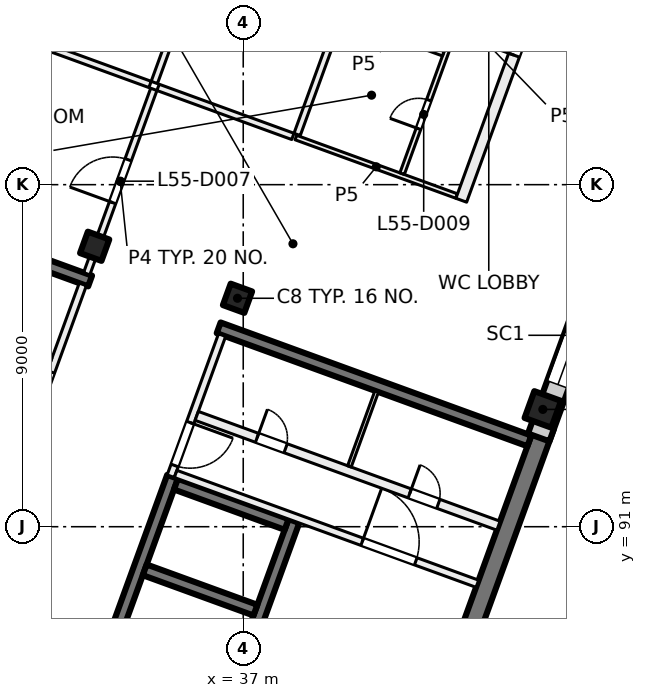
"""IFC4 building model, lengths in metres.
Left out: names, types, materials, properties, quantities, classifications, styles, units other than length and angle.
Written with IfcOpenShell. Run it as: python <this file> out.ifc"""

import sys

from ifc_helpers import new_model, si_unit, direction, frame, frame_2d, origin, origin_2d, place, context, subcontext, project, spatial, rectangle, extrude, element, fill, save


model = new_model("IFC4")
c1 = context("Model", 3, precision=1e-05, world=origin(), true_north=direction((0.0, 1.0)))
c2 = subcontext(c1, "Body", "Model", "MODEL_VIEW")
j1 = project(units=[si_unit("LENGTHUNIT", "METRE"), si_unit("PLANEANGLEUNIT", "RADIAN")], contexts=[c1])
p1 = place(None, origin())
s1 = spatial("IfcSite", under=j1, at=p1, CompositionType="ELEMENT")
p2 = place(p1, origin())
s2 = spatial("IfcBuilding", under=s1, at=p2, CompositionType="ELEMENT")
p3 = place(p2, frame((0.0, 0.0, 232.0)))
s3 = spatial("IfcBuildingStorey", under=s2, at=p3, CompositionType="ELEMENT", Elevation=232.0)
for number, where, z_axis, x_axis in (
    (1, (36.849, 97.011, 0.0), (0.0, 0.0, 1.0), (-0.342, -0.94, 0.0)),
    (2, (33.091, 98.379, 0.0), (0.0, 0.0, 1.0), (-0.342, -0.94, 0.0)),
):
    element("IfcColumn", number, at=place(p3, frame(where, z_axis=z_axis, x_axis=x_axis)), inside=s3, PredefinedType="COLUMN", context=c2, shape_type="SweptSolid", body=[
        extrude(rectangle(XDim=0.6, YDim=0.6, at=origin_2d()), origin(), (0.0, 0.0, 1.0), 4.0),
    ])
p4 = place(p3, frame((44.884, 94.087, 0.0), z_axis=(0.0, 0.0, 1.0), x_axis=(-0.342020143326, -0.939692620786, 0.0)))
e3 = element("IfcColumn", 3, at=p4, inside=s3, PredefinedType="COLUMN", context=c2, shape_type="SweptSolid", body=[
    extrude(rectangle(XDim=0.75, YDim=0.75, at=origin_2d()), origin(), (0.0, 0.0, 1.0), 4.0),
])
p5 = place(p3, frame((41.874, 85.232, 0.0), z_axis=(0.0, 0.0, 1.0), x_axis=(0.342020437038, 0.939692513883, 0.0)))
e4 = element("IfcWall", 4, at=p5, inside=s3, PredefinedType="SHEAR", context=c2, shape_type="SweptSolid", body=[
    extrude(rectangle(XDim=8.975, YDim=0.5, at=frame_2d((4.487, 0.0))), origin(), (0.0, 0.0, 1.0), 4.0),
])
p6 = place(p3, frame((30.949, 80.801, 0.0), z_axis=(0.0, 0.0, 1.0), x_axis=(0.342016684409, 0.939693879721, 0.0)))
e5 = element("IfcWall", 5, at=p6, inside=s3, PredefinedType="SHEAR", context=c2, shape_type="SweptSolid", body=[
    extrude(rectangle(XDim=12.25, YDim=0.3, at=frame_2d((6.125, 0.0))), origin(), (0.0, 0.0, 1.0), 4.0),
])
p7 = place(p6, frame((0.9, 0.0, 0.0)))
e6 = element("IfcOpeningElement", 6, at=p7, cuts=e5, PredefinedType="OPENING", context=c2, shape_type="SweptSolid", body=[
    extrude(rectangle(XDim=0.8, YDim=2.1, at=frame_2d((0.4, 1.05))), frame((0.0, 0.16, 0.0), z_axis=(0.0, -1.0, 0.0), x_axis=(1.0, 0.0, 0.0)), (0.0, 0.0, 1.0), 0.32),
])
p8 = place(p6, frame((5.7, 0.0, 0.0)))
e7 = element("IfcOpeningElement", 7, at=p8, cuts=e5, PredefinedType="OPENING", context=c2, shape_type="SweptSolid", body=[
    extrude(rectangle(XDim=0.8, YDim=2.1, at=frame_2d((0.4, 1.05))), frame((0.0, 0.16, 0.0), z_axis=(0.0, -1.0, 0.0), x_axis=(1.0, 0.0, 0.0)), (0.0, 0.0, 1.0), 0.32),
])
p9 = place(p3, frame((34.144, 79.638, 0.0), z_axis=(0.0, 0.0, 1.0), x_axis=(0.342016684409, 0.939693879721, 0.0)))
e8 = element("IfcWall", 8, at=p9, inside=s3, PredefinedType="SHEAR", context=c2, shape_type="SweptSolid", body=[
    extrude(rectangle(XDim=12.25, YDim=0.3, at=frame_2d((6.125, 0.0))), origin(), (0.0, 0.0, 1.0), 4.0),
])
for number, where, z_axis, x_axis in (
    (9, (37.321, 88.805, 0.0), (0.0, 0.0, 1.0), (-0.94, 0.342, 0.0)),
    (10, (38.142, 91.06, 0.0), (0.0, 0.0, 1.0), (-0.94, 0.342, 0.0)),
):
    element("IfcWall", number, at=place(p3, frame(where, z_axis=z_axis, x_axis=x_axis)), inside=s3, PredefinedType="SHEAR", context=c2, shape_type="SweptSolid", body=[
        extrude(rectangle(XDim=3.1, YDim=0.3, at=frame_2d((1.55, 0.0))), origin(), (0.0, 0.0, 1.0), 4.0),
    ])
p10 = place(p3, frame((44.529, 93.258, 0.0), z_axis=(0.0, 0.0, 1.0), x_axis=(-0.9396917844, 0.342022441267, 0.0)))
e11 = element("IfcWall", 11, at=p10, inside=s3, PredefinedType="SHEAR", context=c2, shape_type="SweptSolid", body=[
    extrude(rectangle(XDim=8.7, YDim=0.3, at=frame_2d((4.35, 0.0))), origin(), (0.0, 0.0, 1.0), 4.0),
])
p11 = place(p3, frame((32.971, 97.465, 0.0), z_axis=(0.0, 0.0, 1.0), x_axis=(-0.939695066972, 0.34201342241, 0.0)))
e12 = element("IfcWall", 12, at=p11, inside=s3, PredefinedType="SHEAR", context=c2, shape_type="SweptSolid", body=[
    extrude(rectangle(XDim=8.7, YDim=0.3, at=frame_2d((4.35, 0.0))), origin(), (0.0, 0.0, 1.0), 4.0),
])
p12 = place(p3, frame((52.212, 113.783, 0.0), z_axis=(0.0, 0.0, 1.0), x_axis=(-0.34202521188, -0.939690775968, 0.0)))
e13 = element("IfcWall", 13, at=p12, inside=s3, PredefinedType="SOLIDWALL", context=c2, shape_type="SweptSolid", body=[
    extrude(rectangle(XDim=21.745, YDim=0.6, at=frame_2d((10.873, 0.0))), origin(), (0.0, 0.0, 1.0), 3.625),
])
p13 = place(p12, frame((3.765, 0.0, 0.9)))
e14 = element("IfcOpeningElement", 14, at=p13, cuts=e13, PredefinedType="OPENING", context=c2, shape_type="SweptSolid", body=[
    extrude(rectangle(XDim=3.0, YDim=2.4, at=frame_2d((1.5, 1.2))), frame((0.0, 0.31, 0.0), z_axis=(0.0, -1.0, 0.0), x_axis=(1.0, 0.0, 0.0)), (0.0, 0.0, 1.0), 0.62),
])
p14 = place(p12, frame((8.265, 0.0, 0.9)))
e15 = element("IfcOpeningElement", 15, at=p14, cuts=e13, PredefinedType="OPENING", context=c2, shape_type="SweptSolid", body=[
    extrude(rectangle(XDim=3.0, YDim=2.4, at=frame_2d((1.5, 1.2))), frame((0.0, 0.31, 0.0), z_axis=(0.0, -1.0, 0.0), x_axis=(1.0, 0.0, 0.0)), (0.0, 0.0, 1.0), 0.62),
])
p15 = place(p12, frame((12.765, 0.0, 0.9)))
e16 = element("IfcOpeningElement", 16, at=p15, cuts=e13, PredefinedType="OPENING", context=c2, shape_type="SweptSolid", body=[
    extrude(rectangle(XDim=3.0, YDim=2.4, at=frame_2d((1.5, 1.2))), frame((0.0, 0.31, 0.0), z_axis=(0.0, -1.0, 0.0), x_axis=(1.0, 0.0, 0.0)), (0.0, 0.0, 1.0), 0.62),
])
p16 = place(p12, frame((17.265, 0.0, 0.9)))
e17 = element("IfcOpeningElement", 17, at=p16, cuts=e13, PredefinedType="OPENING", context=c2, shape_type="SweptSolid", body=[
    extrude(rectangle(XDim=3.0, YDim=2.4, at=frame_2d((1.5, 1.2))), frame((0.0, 0.31, 0.0), z_axis=(0.0, -1.0, 0.0), x_axis=(1.0, 0.0, 0.0)), (0.0, 0.0, 1.0), 0.62),
])
p17 = place(p3, frame((24.666, 100.669, 0.0), z_axis=(0.0, 0.0, 1.0), x_axis=(0.34201964167, 0.939692803373, 0.0)))
e18 = element("IfcWall", 18, at=p17, inside=s3, PredefinedType="SOLIDWALL", context=c2, shape_type="SweptSolid", body=[
    extrude(rectangle(XDim=32.884, YDim=0.6, at=frame_2d((16.442, 0.0))), origin(), (0.0, 0.0, 1.0), 3.625),
])
p18 = place(p17, frame((1.48, 0.0, 0.9)))
e19 = element("IfcOpeningElement", 19, at=p18, cuts=e18, PredefinedType="OPENING", context=c2, shape_type="SweptSolid", body=[
    extrude(rectangle(XDim=3.0, YDim=2.4, at=frame_2d((1.5, 1.2))), frame((0.0, 0.31, 0.0), z_axis=(0.0, -1.0, 0.0), x_axis=(1.0, 0.0, 0.0)), (0.0, 0.0, 1.0), 0.62),
])
p19 = place(p17, frame((5.98, 0.0, 0.9)))
e20 = element("IfcOpeningElement", 20, at=p19, cuts=e18, PredefinedType="OPENING", context=c2, shape_type="SweptSolid", body=[
    extrude(rectangle(XDim=3.0, YDim=2.4, at=frame_2d((1.5, 1.2))), frame((0.0, 0.31, 0.0), z_axis=(0.0, -1.0, 0.0), x_axis=(1.0, 0.0, 0.0)), (0.0, 0.0, 1.0), 0.62),
])
p20 = place(p17, frame((10.48, 0.0, 0.9)))
e21 = element("IfcOpeningElement", 21, at=p20, cuts=e18, PredefinedType="OPENING", context=c2, shape_type="SweptSolid", body=[
    extrude(rectangle(XDim=3.0, YDim=2.4, at=frame_2d((1.5, 1.2))), frame((0.0, 0.31, 0.0), z_axis=(0.0, -1.0, 0.0), x_axis=(1.0, 0.0, 0.0)), (0.0, 0.0, 1.0), 0.62),
])
p21 = place(p17, frame((14.98, 0.0, 0.9)))
e22 = element("IfcOpeningElement", 22, at=p21, cuts=e18, PredefinedType="OPENING", context=c2, shape_type="SweptSolid", body=[
    extrude(rectangle(XDim=3.0, YDim=2.4, at=frame_2d((1.5, 1.2))), frame((0.0, 0.31, 0.0), z_axis=(0.0, -1.0, 0.0), x_axis=(1.0, 0.0, 0.0)), (0.0, 0.0, 1.0), 0.62),
])
p22 = place(p17, frame((19.48, 0.0, 0.9)))
e23 = element("IfcOpeningElement", 23, at=p22, cuts=e18, PredefinedType="OPENING", context=c2, shape_type="SweptSolid", body=[
    extrude(rectangle(XDim=3.0, YDim=2.4, at=frame_2d((1.5, 1.2))), frame((0.0, 0.31, 0.0), z_axis=(0.0, -1.0, 0.0), x_axis=(1.0, 0.0, 0.0)), (0.0, 0.0, 1.0), 0.62),
])
p23 = place(p17, frame((23.98, 0.0, 0.9)))
e24 = element("IfcOpeningElement", 24, at=p23, cuts=e18, PredefinedType="OPENING", context=c2, shape_type="SweptSolid", body=[
    extrude(rectangle(XDim=3.0, YDim=2.4, at=frame_2d((1.5, 1.2))), frame((0.0, 0.31, 0.0), z_axis=(0.0, -1.0, 0.0), x_axis=(1.0, 0.0, 0.0)), (0.0, 0.0, 1.0), 0.62),
])
p24 = place(p17, frame((28.48, 0.0, 0.9)))
e25 = element("IfcOpeningElement", 25, at=p24, cuts=e18, PredefinedType="OPENING", context=c2, shape_type="SweptSolid", body=[
    extrude(rectangle(XDim=3.0, YDim=2.4, at=frame_2d((1.5, 1.2))), frame((0.0, 0.31, 0.0), z_axis=(0.0, -1.0, 0.0), x_axis=(1.0, 0.0, 0.0)), (0.0, 0.0, 1.0), 0.62),
])
p25 = place(p3, frame((31.427, 93.663, 0.0), z_axis=(0.0, 0.0, 1.0), x_axis=(0.342030870568, 0.93968871632, 0.0)))
e26 = element("IfcWall", 26, at=p25, inside=s3, PredefinedType="PARTITIONING", context=c2, shape_type="SweptSolid", body=[
    extrude(rectangle(XDim=3.95, YDim=0.2, at=frame_2d((1.975, 0.0))), origin(), (0.0, 0.0, 1.0), 3.625),
])
p26 = place(p25, frame((0.3, 0.0, 0.0)))
e27 = element("IfcOpeningElement", 27, at=p26, cuts=e26, PredefinedType="OPENING", context=c2, shape_type="SweptSolid", body=[
    extrude(rectangle(XDim=1.2, YDim=2.1, at=frame_2d((0.6, 1.05))), frame((0.0, 0.11, 0.0), z_axis=(0.0, -1.0, 0.0), x_axis=(1.0, 0.0, 0.0)), (0.0, 0.0, 1.0), 0.22),
])
p27 = place(p3, frame((23.983, 98.208, 0.0), z_axis=(0.0, 0.0, 1.0), x_axis=(0.939699751196, -0.342000552051, 0.0)))
e28 = element("IfcWall", 28, at=p27, inside=s3, PredefinedType="PARTITIONING", context=c2, shape_type="SweptSolid", body=[
    extrude(rectangle(XDim=8.45, YDim=0.25, at=frame_2d((4.225, 0.0))), origin(), (0.0, 0.0, 1.0), 3.625),
])
p28 = place(p27, frame((3.725, 0.0, 0.0)))
e29 = element("IfcOpeningElement", 29, at=p28, cuts=e28, PredefinedType="OPENING", context=c2, shape_type="SweptSolid", body=[
    extrude(rectangle(XDim=1.0, YDim=2.1, at=frame_2d((0.5, 1.05))), frame((0.0, 0.135, 0.0), z_axis=(0.0, -1.0, 0.0), x_axis=(1.0, 0.0, 0.0)), (0.0, 0.0, 1.0), 0.27),
])
p29 = place(p3, frame((36.443, 96.041, 0.0), z_axis=(0.0, 0.0, 1.0), x_axis=(-0.341996156931, -0.939701350773, 0.0)))
e30 = element("IfcWall", 30, at=p29, inside=s3, PredefinedType="PARTITIONING", context=c2, shape_type="SweptSolid", body=[
    extrude(rectangle(XDim=3.95, YDim=0.2, at=frame_2d((1.975, 0.0))), origin(), (0.0, 0.0, 1.0), 3.625),
])
p30 = place(p29, frame((2.45, 0.0, 0.0)))
e31 = element("IfcOpeningElement", 31, at=p30, cuts=e30, PredefinedType="OPENING", context=c2, shape_type="SweptSolid", body=[
    extrude(rectangle(XDim=1.2, YDim=2.1, at=frame_2d((0.6, 1.05))), frame((0.0, 0.11, 0.0), z_axis=(0.0, -1.0, 0.0), x_axis=(1.0, 0.0, 0.0)), (0.0, 0.0, 1.0), 0.22),
])
p31 = place(p3, frame((35.22, 92.389, 0.0), z_axis=(0.0, 0.0, 1.0), x_axis=(0.939690465531, -0.342026064782, 0.0)))
e32 = element("IfcWall", 32, at=p31, inside=s3, PredefinedType="PARTITIONING", context=c2, shape_type="SweptSolid", body=[
    extrude(rectangle(XDim=8.45, YDim=0.2, at=frame_2d((4.225, 0.0))), origin(), (0.0, 0.0, 1.0), 3.625),
])
p32 = place(p31, frame((5.225, 0.0, 0.0)))
e33 = element("IfcOpeningElement", 33, at=p32, cuts=e32, PredefinedType="OPENING", context=c2, shape_type="SweptSolid", body=[
    extrude(rectangle(XDim=1.5, YDim=2.1, at=frame_2d((0.75, 1.05))), frame((0.0, 0.11, 0.0), z_axis=(0.0, -1.0, 0.0), x_axis=(1.0, 0.0, 0.0)), (0.0, 0.0, 1.0), 0.22),
])
p33 = place(p3, frame((35.776, 93.916, 0.0), z_axis=(0.0, 0.0, 1.0), x_axis=(0.939690465531, -0.342026064782, 0.0)))
e34 = element("IfcWall", 34, at=p33, inside=s3, PredefinedType="PARTITIONING", context=c2, shape_type="SweptSolid", body=[
    extrude(rectangle(XDim=8.45, YDim=0.25, at=frame_2d((4.225, 0.0))), origin(), (0.0, 0.0, 1.0), 3.625),
])
p34 = place(p33, frame((1.69, 0.0, 0.0)))
e35 = element("IfcOpeningElement", 35, at=p34, cuts=e34, PredefinedType="OPENING", context=c2, shape_type="SweptSolid", body=[
    extrude(rectangle(XDim=0.8, YDim=2.1, at=frame_2d((0.4, 1.05))), frame((0.0, 0.135, 0.0), z_axis=(0.0, -1.0, 0.0), x_axis=(1.0, 0.0, 0.0)), (0.0, 0.0, 1.0), 0.27),
])
p35 = place(p33, frame((5.965, 0.0, 0.0)))
e36 = element("IfcOpeningElement", 36, at=p35, cuts=e34, PredefinedType="OPENING", context=c2, shape_type="SweptSolid", body=[
    extrude(rectangle(XDim=0.8, YDim=2.1, at=frame_2d((0.4, 1.05))), frame((0.0, 0.135, 0.0), z_axis=(0.0, -1.0, 0.0), x_axis=(1.0, 0.0, 0.0)), (0.0, 0.0, 1.0), 0.27),
])
p36 = place(p3, frame((40.512, 94.56, 0.0), z_axis=(0.0, 0.0, 1.0), x_axis=(-0.342023078919, -0.939691552312, 0.0)))
e37 = element("IfcWall", 37, at=p36, inside=s3, PredefinedType="PARTITIONING", context=c2, shape_type="SweptSolid", body=[
    extrude(rectangle(XDim=2.1, YDim=0.1, at=frame_2d((1.05, 0.0))), origin(), (0.0, 0.0, 1.0), 3.625),
])
p37 = place(p3, frame((26.736, 105.48, 0.0), z_axis=(0.0, 0.0, 1.0), x_axis=(0.939705074886, -0.341985924028, 0.0)))
e38 = element("IfcWall", 38, at=p37, inside=s3, PredefinedType="PARTITIONING", context=c2, shape_type="SweptSolid", body=[
    extrude(rectangle(XDim=8.313, YDim=0.175, at=frame_2d((4.157, 0.0))), origin(), (0.0, 0.0, 1.0), 3.625),
])
p38 = place(p3, frame((32.881, 97.657, 0.0), z_axis=(0.0, 0.0, 1.0), x_axis=(0.342058204353, 0.939678766832, 0.0)))
e39 = element("IfcWall", 39, at=p38, inside=s3, PredefinedType="PARTITIONING", context=c2, shape_type="SweptSolid", body=[
    extrude(rectangle(XDim=5.163, YDim=0.175, at=frame_2d((2.581, 0.0))), origin(), (0.0, 0.0, 1.0), 3.625),
])
p39 = place(p38, frame((1.991, 0.0, 0.0)))
e40 = element("IfcOpeningElement", 40, at=p39, cuts=e39, PredefinedType="OPENING", context=c2, shape_type="SweptSolid", body=[
    extrude(rectangle(XDim=1.2, YDim=2.1, at=frame_2d((0.6, 1.05))), frame((0.0, 0.097, 0.0), z_axis=(0.0, -1.0, 0.0), x_axis=(1.0, 0.0, 0.0)), (0.0, 0.0, 1.0), 0.195),
])
p40 = place(p3, frame((34.759, 102.56, 0.0), z_axis=(0.0, 0.0, 1.0), x_axis=(0.939770757411, -0.341805388365, 0.0)))
e41 = element("IfcWall", 41, at=p40, inside=s3, PredefinedType="PARTITIONING", context=c2, shape_type="SweptSolid", body=[
    extrude(rectangle(XDim=3.774, YDim=0.175, at=frame_2d((1.887, 0.0))), origin(), (0.0, 0.0, 1.0), 3.625),
])
p41 = place(p3, frame((34.66, 102.689, 0.0), z_axis=(0.0, 0.0, 1.0), x_axis=(0.341951828534, 0.939717482524, 0.0)))
e42 = element("IfcWall", 42, at=p41, inside=s3, PredefinedType="PARTITIONING", context=c2, shape_type="SweptSolid", body=[
    extrude(rectangle(XDim=8.826, YDim=0.175, at=frame_2d((4.413, 0.0))), origin(), (0.0, 0.0, 1.0), 3.625),
])
p42 = place(p41, frame((4.813, 0.0, 0.0)))
e43 = element("IfcOpeningElement", 43, at=p42, cuts=e42, PredefinedType="OPENING", context=c2, shape_type="SweptSolid", body=[
    extrude(rectangle(XDim=1.2, YDim=2.1, at=frame_2d((0.6, 1.05))), frame((0.0, 0.097, 0.0), z_axis=(0.0, -1.0, 0.0), x_axis=(1.0, 0.0, 0.0)), (0.0, 0.0, 1.0), 0.195),
])
p43 = place(p3, frame((38.385, 101.24, 0.0), z_axis=(0.0, 0.0, 1.0), x_axis=(0.939711088937, -0.341969398235, 0.0)))
e44 = element("IfcWall", 44, at=p43, inside=s3, PredefinedType="PARTITIONING", context=c2, shape_type="SweptSolid", body=[
    extrude(rectangle(XDim=4.503, YDim=0.125, at=frame_2d((2.252, 0.0))), origin(), (0.0, 0.0, 1.0), 3.625),
])
p44 = place(p3, frame((38.418, 101.322, 0.0), z_axis=(0.0, 0.0, 1.0), x_axis=(0.342101536507, 0.939662992099, 0.0)))
e45 = element("IfcWall", 45, at=p44, inside=s3, PredefinedType="PARTITIONING", context=c2, shape_type="SweptSolid", body=[
    extrude(rectangle(XDim=8.913, YDim=0.175, at=frame_2d((4.457, 0.0))), origin(), (0.0, 0.0, 1.0), 3.625),
])
p45 = place(p3, frame((41.181, 100.29, 0.0), z_axis=(0.0, 0.0, 1.0), x_axis=(0.34222012082, 0.939619810831, 0.0)))
e46 = element("IfcWall", 46, at=p45, inside=s3, PredefinedType="PARTITIONING", context=c2, shape_type="SweptSolid", body=[
    extrude(rectangle(XDim=8.875, YDim=0.125, at=frame_2d((4.438, 0.0))), origin(), (0.0, 0.0, 1.0), 3.625),
])
p46 = place(p45, frame((1.258, 0.0, 0.0)))
e47 = element("IfcOpeningElement", 47, at=p46, cuts=e46, PredefinedType="OPENING", context=c2, shape_type="SweptSolid", body=[
    extrude(rectangle(XDim=0.8, YDim=2.1, at=frame_2d((0.4, 1.05))), frame((0.0, 0.073, 0.0), z_axis=(0.0, -1.0, 0.0), x_axis=(1.0, 0.0, 0.0)), (0.0, 0.0, 1.0), 0.145),
])
p47 = place(p45, frame((4.437, 0.0, 0.0)))
e48 = element("IfcOpeningElement", 48, at=p47, cuts=e46, PredefinedType="OPENING", context=c2, shape_type="SweptSolid", body=[
    extrude(rectangle(XDim=0.8, YDim=2.1, at=frame_2d((0.4, 1.05))), frame((0.0, 0.073, 0.0), z_axis=(0.0, -1.0, 0.0), x_axis=(1.0, 0.0, 0.0)), (0.0, 0.0, 1.0), 0.145),
])
p48 = place(p45, frame((7.116, 0.0, 0.0)))
e49 = element("IfcOpeningElement", 49, at=p48, cuts=e46, PredefinedType="OPENING", context=c2, shape_type="SweptSolid", body=[
    extrude(rectangle(XDim=1.0, YDim=2.1, at=frame_2d((0.5, 1.05))), frame((0.0, 0.073, 0.0), z_axis=(0.0, -1.0, 0.0), x_axis=(1.0, 0.0, 0.0)), (0.0, 0.0, 1.0), 0.145),
])
p49 = place(p3, frame((42.264, 103.446, 0.0), z_axis=(0.0, 0.0, 1.0), x_axis=(-0.939640574808, 0.342163104635, 0.0)))
e50 = element("IfcWall", 50, at=p49, inside=s3, PredefinedType="PARTITIONING", context=c2, shape_type="SweptSolid", body=[
    extrude(rectangle(XDim=2.8, YDim=0.125, at=frame_2d((1.4, 0.0))), origin(), (0.0, 0.0, 1.0), 3.625),
])
p50 = place(p3, frame((42.737, 99.59, 0.0), z_axis=(0.0, 0.0, 1.0), x_axis=(0.341992703977, 0.939702607438, 0.0)))
e51 = element("IfcWall", 51, at=p50, inside=s3, PredefinedType="PARTITIONING", context=c2, shape_type="SweptSolid", body=[
    extrude(rectangle(XDim=23.006, YDim=0.3, at=frame_2d((11.503, 0.0))), origin(), (0.0, 0.0, 1.0), 3.625),
])
p51 = place(p50, frame((4.062, 0.0, 0.0)))
e52 = element("IfcOpeningElement", 52, at=p51, cuts=e51, PredefinedType="OPENING", context=c2, shape_type="SweptSolid", body=[
    extrude(rectangle(XDim=1.0, YDim=2.1, at=frame_2d((0.5, 1.05))), frame((0.0, 0.16, 0.0), z_axis=(0.0, -1.0, 0.0), x_axis=(1.0, 0.0, 0.0)), (0.0, 0.0, 1.0), 0.32),
])
p52 = place(p50, frame((10.162, 0.0, 0.0)))
e53 = element("IfcOpeningElement", 53, at=p52, cuts=e51, PredefinedType="OPENING", context=c2, shape_type="SweptSolid", body=[
    extrude(rectangle(XDim=0.8, YDim=2.1, at=frame_2d((0.4, 1.05))), frame((0.0, 0.16, 0.0), z_axis=(0.0, -1.0, 0.0), x_axis=(1.0, 0.0, 0.0)), (0.0, 0.0, 1.0), 0.32),
])
p53 = place(p50, frame((13.712, 0.0, 0.0)))
e54 = element("IfcOpeningElement", 54, at=p53, cuts=e51, PredefinedType="OPENING", context=c2, shape_type="SweptSolid", body=[
    extrude(rectangle(XDim=1.2, YDim=2.1, at=frame_2d((0.6, 1.05))), frame((0.0, 0.16, 0.0), z_axis=(0.0, -1.0, 0.0), x_axis=(1.0, 0.0, 0.0)), (0.0, 0.0, 1.0), 0.32),
])
p54 = place(p50, frame((18.662, 0.0, 0.0)))
e55 = element("IfcOpeningElement", 55, at=p54, cuts=e51, PredefinedType="OPENING", context=c2, shape_type="SweptSolid", body=[
    extrude(rectangle(XDim=1.8, YDim=2.1, at=frame_2d((0.9, 1.05))), frame((0.0, 0.16, 0.0), z_axis=(0.0, -1.0, 0.0), x_axis=(1.0, 0.0, 0.0)), (0.0, 0.0, 1.0), 0.32),
])
p55 = place(p16, origin())
e56 = element("IfcWindow", 56, at=p55, inside=s3, PartitioningType="SINGLE_PANEL", PredefinedType="WINDOW", context=c2, shape_type="SweptSolid", body=[
    extrude(rectangle(XDim=3.0, YDim=2.4, at=frame_2d((1.5, 1.2))), frame((0.0, 0.03, 0.0), z_axis=(0.0, -1.0, 0.0), x_axis=(1.0, 0.0, 0.0)), (0.0, 0.0, 1.0), 0.06),
])
fill(e17, e56)
p56 = place(p26, origin())
e57 = element("IfcDoor", 57, at=p56, inside=s3, OperationType="DOUBLE_DOOR_SINGLE_SWING", PredefinedType="DOOR", context=c2, shape_type="SweptSolid", body=[
    extrude(rectangle(XDim=1.2, YDim=2.1, at=frame_2d((0.6, 1.05))), frame((0.0, 0.025, 0.0), z_axis=(0.0, -1.0, 0.0), x_axis=(1.0, 0.0, 0.0)), (0.0, 0.0, 1.0), 0.05),
])
fill(e27, e57)
p57 = place(p30, origin())
e58 = element("IfcDoor", 58, at=p57, inside=s3, OperationType="DOUBLE_DOOR_SINGLE_SWING", PredefinedType="DOOR", context=c2, shape_type="SweptSolid", body=[
    extrude(rectangle(XDim=1.2, YDim=2.1, at=frame_2d((0.6, 1.05))), frame((0.0, 0.025, 0.0), z_axis=(0.0, -1.0, 0.0), x_axis=(1.0, 0.0, 0.0)), (0.0, 0.0, 1.0), 0.05),
])
fill(e31, e58)
p58 = place(p32, origin())
e59 = element("IfcDoor", 59, at=p58, inside=s3, OperationType="DOUBLE_DOOR_SINGLE_SWING", PredefinedType="DOOR", context=c2, shape_type="SweptSolid", body=[
    extrude(rectangle(XDim=1.5, YDim=2.1, at=frame_2d((0.75, 1.05))), frame((0.0, 0.025, 0.0), z_axis=(0.0, -1.0, 0.0), x_axis=(1.0, 0.0, 0.0)), (0.0, 0.0, 1.0), 0.05),
])
fill(e33, e59)
p59 = place(p34, origin())
e60 = element("IfcDoor", 60, at=p59, inside=s3, OperationType="SINGLE_SWING_RIGHT", PredefinedType="DOOR", context=c2, shape_type="SweptSolid", body=[
    extrude(rectangle(XDim=0.8, YDim=2.1, at=frame_2d((0.4, 1.05))), frame((0.0, 0.025, 0.0), z_axis=(0.0, -1.0, 0.0), x_axis=(1.0, 0.0, 0.0)), (0.0, 0.0, 1.0), 0.05),
])
fill(e35, e60)
p60 = place(p35, origin())
e61 = element("IfcDoor", 61, at=p60, inside=s3, OperationType="SINGLE_SWING_LEFT", PredefinedType="DOOR", context=c2, shape_type="SweptSolid", body=[
    extrude(rectangle(XDim=0.8, YDim=2.1, at=frame_2d((0.4, 1.05))), frame((0.0, 0.025, 0.0), z_axis=(0.0, -1.0, 0.0), x_axis=(1.0, 0.0, 0.0)), (0.0, 0.0, 1.0), 0.05),
])
fill(e36, e61)
p61 = place(p39, origin())
e62 = element("IfcDoor", 62, at=p61, inside=s3, OperationType="DOUBLE_DOOR_SINGLE_SWING", PredefinedType="DOOR", context=c2, shape_type="SweptSolid", body=[
    extrude(rectangle(XDim=1.2, YDim=2.1, at=frame_2d((0.6, 1.05))), frame((0.0, 0.025, 0.0), z_axis=(0.0, -1.0, 0.0), x_axis=(1.0, 0.0, 0.0)), (0.0, 0.0, 1.0), 0.05),
])
fill(e40, e62)
p62 = place(p51, origin())
e63 = element("IfcDoor", 63, at=p62, inside=s3, OperationType="SINGLE_SWING_LEFT", PredefinedType="DOOR", context=c2, shape_type="SweptSolid", body=[
    extrude(rectangle(XDim=1.0, YDim=2.1, at=frame_2d((0.5, 1.05))), frame((0.0, 0.025, 0.0), z_axis=(0.0, -1.0, 0.0), x_axis=(1.0, 0.0, 0.0)), (0.0, 0.0, 1.0), 0.05),
])
fill(e52, e63)
p63 = place(p46, origin())
e64 = element("IfcDoor", 64, at=p63, inside=s3, OperationType="SINGLE_SWING_LEFT", PredefinedType="DOOR", context=c2, shape_type="SweptSolid", body=[
    extrude(rectangle(XDim=0.8, YDim=2.1, at=frame_2d((0.4, 1.05))), frame((0.0, 0.025, 0.0), z_axis=(0.0, -1.0, 0.0), x_axis=(1.0, 0.0, 0.0)), (0.0, 0.0, 1.0), 0.05),
])
fill(e47, e64)
save(model, sys.argv[1])
